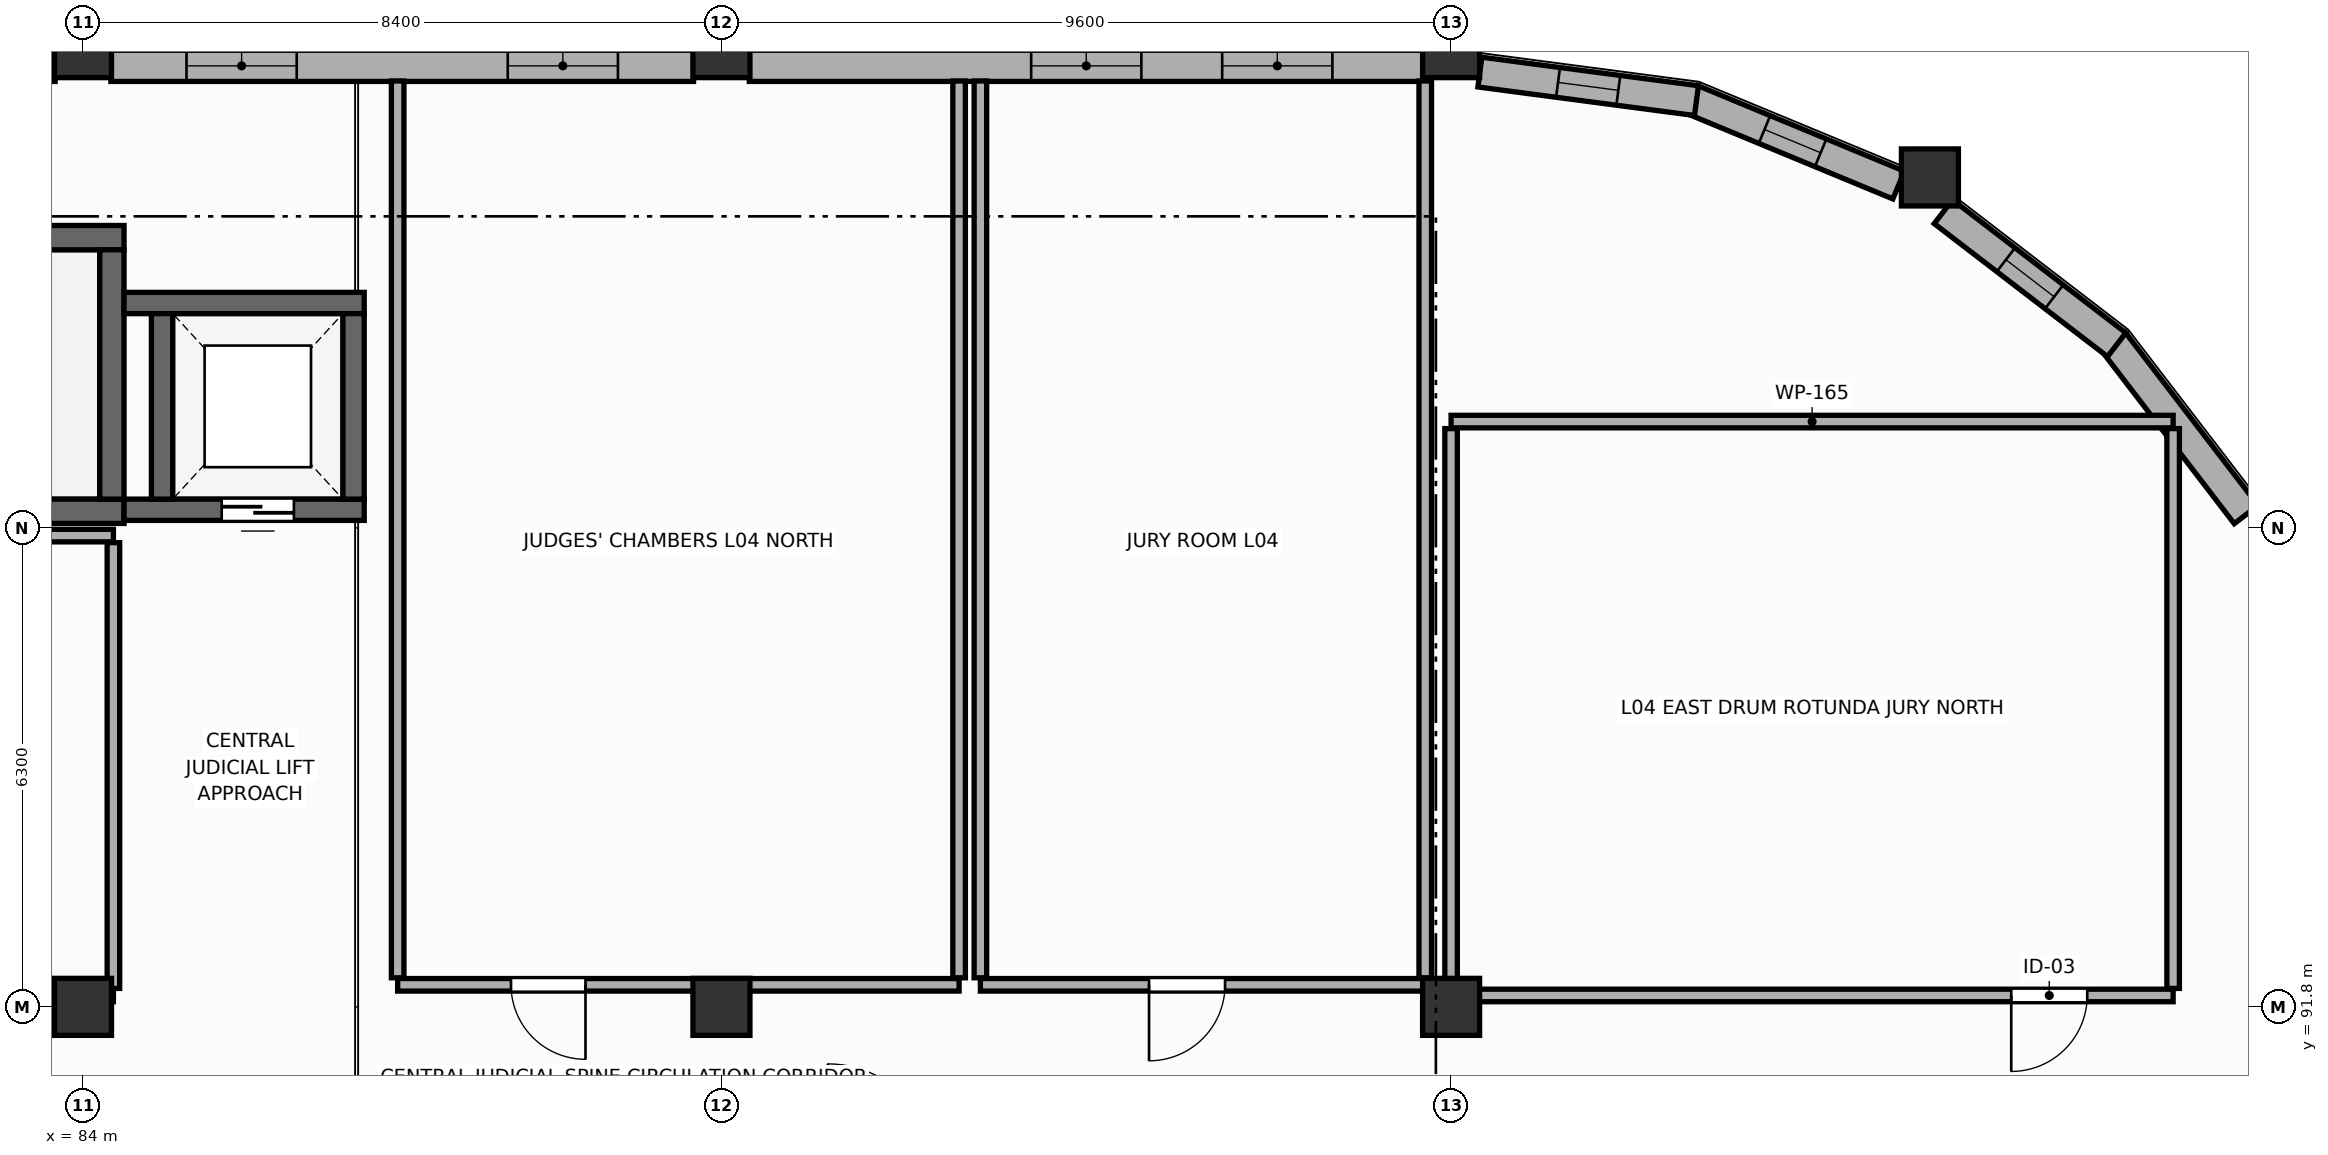
"""IFC4 building model, lengths in metres.
Left out: names, types, materials, properties, quantities, classifications, styles, units other than length and angle.
Written with IfcOpenShell. Run it as: python <this file> out.ifc"""

import sys

from ifc_helpers import new_model, si_unit, direction, frame, frame_2d, origin, origin_2d, place, context, subcontext, project, spatial, rectangle, circle, extrude, element, fill, save


model = new_model("IFC4")
c1 = context("Model", 3, precision=1e-05, world=origin(), true_north=direction((0.0, 1.0)))
c2 = subcontext(c1, "Body", "Model", "MODEL_VIEW")
j1 = project(units=[si_unit("LENGTHUNIT", "METRE"), si_unit("PLANEANGLEUNIT", "RADIAN")], contexts=[c1])
p1 = place(None, origin())
s1 = spatial("IfcSite", under=j1, at=p1, CompositionType="ELEMENT")
p2 = place(p1, origin())
s2 = spatial("IfcBuilding", under=s1, at=p2, CompositionType="ELEMENT")
p3 = place(p2, frame((0.0, 0.0, 14.4)))
s3 = spatial("IfcBuildingStorey", under=s2, at=p3, CompositionType="ELEMENT", Elevation=14.4)
for number, where, z_axis, x_axis in (
    (1, (84.0, 91.8, 0.0), (0.0, 0.0, 1.0), (1.0, 0.0, 0.0)),
    (2, (84.0, 104.4, 0.0), (0.0, 0.0, 1.0), (1.0, 0.0, 0.0)),
    (3, (92.4, 91.8, 0.0), (0.0, 0.0, 1.0), (1.0, 0.0, 0.0)),
    (4, (92.4, 104.4, 0.0), (0.0, 0.0, 1.0), (1.0, 0.0, 0.0)),
    (5, (102.0, 91.8, 0.0), (0.0, 0.0, 1.0), (1.0, 0.0, 0.0)),
    (6, (102.0, 104.4, 0.0), (0.0, 0.0, 1.0), (1.0, 0.0, 0.0)),
):
    element("IfcColumn", number, at=place(p3, frame(where, z_axis=z_axis, x_axis=x_axis)), inside=s3, PredefinedType="COLUMN", context=c2, shape_type="SweptSolid", body=[
        extrude(rectangle(XDim=0.75, YDim=0.75, at=origin_2d()), origin(), (0.0, 0.0, 1.0), 4.2),
    ])
p4 = place(p3, frame((108.3, 102.712, 0.0), z_axis=(0.0, 0.0, 1.0), x_axis=(1.0, 0.0, 0.0)))
e7 = element("IfcColumn", 7, at=p4, inside=s3, PredefinedType="COLUMN", context=c2, shape_type="SweptSolid", body=[
    extrude(circle(Radius=0.375, at=origin_2d()), origin(), (0.0, 0.0, 1.0), 4.2),
])
p5 = place(p3, frame((75.967, 104.18, 0.0), z_axis=(0.0, 0.0, 1.0), x_axis=(1.0, 0.0, 0.0)))
e8 = element("IfcWall", 8, at=p5, inside=s3, PredefinedType="STANDARD", context=c2, shape_type="SweptSolid", body=[
    extrude(rectangle(XDim=7.666, YDim=0.41, at=frame_2d((3.833, 0.0))), origin(), (0.0, 0.0, 1.0), 3.09),
])
p6 = place(p3, frame((84.367, 104.18, 0.0), z_axis=(0.0, 0.0, 1.0), x_axis=(1.0, 0.0, 0.0)))
e9 = element("IfcWall", 9, at=p6, inside=s3, PredefinedType="STANDARD", context=c2, shape_type="SweptSolid", body=[
    extrude(rectangle(XDim=7.666, YDim=0.41, at=frame_2d((3.833, 0.0))), origin(), (0.0, 0.0, 1.0), 3.09),
])
p7 = place(p6, frame((0.995, 0.0, 0.85)))
e10 = element("IfcOpeningElement", 10, at=p7, cuts=e9, PredefinedType="OPENING", context=c2, shape_type="SweptSolid", body=[
    extrude(rectangle(XDim=1.45, YDim=2.05, at=frame_2d((0.725, 1.025))), frame((0.0, 0.215, 0.0), z_axis=(0.0, -1.0, 0.0), x_axis=(1.0, 0.0, 0.0)), (0.0, 0.0, 1.0), 0.43),
])
p8 = place(p6, frame((5.221, 0.0, 0.85)))
e11 = element("IfcOpeningElement", 11, at=p8, cuts=e9, PredefinedType="OPENING", context=c2, shape_type="SweptSolid", body=[
    extrude(rectangle(XDim=1.45, YDim=2.05, at=frame_2d((0.725, 1.025))), frame((0.0, 0.215, 0.0), z_axis=(0.0, -1.0, 0.0), x_axis=(1.0, 0.0, 0.0)), (0.0, 0.0, 1.0), 0.43),
])
p9 = place(p3, frame((92.767, 104.18, 0.0), z_axis=(0.0, 0.0, 1.0), x_axis=(1.0, 0.0, 0.0)))
e12 = element("IfcWall", 12, at=p9, inside=s3, PredefinedType="STANDARD", context=c2, shape_type="SweptSolid", body=[
    extrude(rectangle(XDim=8.866, YDim=0.41, at=frame_2d((4.433, 0.0))), origin(), (0.0, 0.0, 1.0), 3.09),
])
p10 = place(p9, frame((3.708, 0.0, 0.85)))
e13 = element("IfcOpeningElement", 13, at=p10, cuts=e12, PredefinedType="OPENING", context=c2, shape_type="SweptSolid", body=[
    extrude(rectangle(XDim=1.45, YDim=2.05, at=frame_2d((0.725, 1.025))), frame((0.0, 0.215, 0.0), z_axis=(0.0, -1.0, 0.0), x_axis=(1.0, 0.0, 0.0)), (0.0, 0.0, 1.0), 0.43),
])
p11 = place(p9, frame((6.221, 0.0, 0.85)))
e14 = element("IfcOpeningElement", 14, at=p11, cuts=e12, PredefinedType="OPENING", context=c2, shape_type="SweptSolid", body=[
    extrude(rectangle(XDim=1.45, YDim=2.05, at=frame_2d((0.725, 1.025))), frame((0.0, 0.215, 0.0), z_axis=(0.0, -1.0, 0.0), x_axis=(1.0, 0.0, 0.0)), (0.0, 0.0, 1.0), 0.43),
])
p12 = place(p3, frame((112.461, 98.277, 0.0), z_axis=(0.0, 0.0, 1.0), x_axis=(-0.608770300127, 0.793346533164, 0.0)))
e15 = element("IfcWall", 15, at=p12, inside=s3, PredefinedType="ELEMENTEDWALL", context=c2, shape_type="SweptSolid", body=[
    extrude(rectangle(XDim=2.874, YDim=0.395, at=frame_2d((1.437, 0.0))), origin(), (0.0, 0.0, 1.0), 3.09),
])
p13 = place(p3, frame((110.757, 100.511, 0.0), z_axis=(0.0, 0.0, 1.0), x_axis=(-0.793346533164, 0.608770300127, 0.0)))
e16 = element("IfcWall", 16, at=p13, inside=s3, PredefinedType="ELEMENTEDWALL", context=c2, shape_type="SweptSolid", body=[
    extrude(rectangle(XDim=2.874, YDim=0.395, at=frame_2d((1.437, 0.0))), origin(), (0.0, 0.0, 1.0), 2.99),
])
p14 = place(p13, frame((1.037, 0.0, 0.85)))
e17 = element("IfcOpeningElement", 17, at=p14, cuts=e16, PredefinedType="OPENING", context=c2, shape_type="SweptSolid", body=[
    extrude(rectangle(XDim=0.8, YDim=1.7, at=frame_2d((0.4, 0.85))), frame((0.0, 0.208, 0.0), z_axis=(0.0, -1.0, 0.0), x_axis=(1.0, 0.0, 0.0)), (0.0, 0.0, 1.0), 0.415),
])
p15 = place(p3, frame((107.888, 102.612, 0.0), z_axis=(0.0, 0.0, 1.0), x_axis=(-0.923871445027, 0.382702956696, 0.0)))
e18 = element("IfcWall", 18, at=p15, inside=s3, PredefinedType="ELEMENTEDWALL", context=c2, shape_type="SweptSolid", body=[
    extrude(rectangle(XDim=2.947, YDim=0.395, at=frame_2d((1.474, 0.0))), origin(), (0.0, 0.0, 1.0), 2.99),
])
p16 = place(p15, frame((1.11, 0.0, 0.85)))
e19 = element("IfcOpeningElement", 19, at=p16, cuts=e18, PredefinedType="OPENING", context=c2, shape_type="SweptSolid", body=[
    extrude(rectangle(XDim=0.8, YDim=1.7, at=frame_2d((0.4, 0.85))), frame((0.0, 0.208, 0.0), z_axis=(0.0, -1.0, 0.0), x_axis=(1.0, 0.0, 0.0)), (0.0, 0.0, 1.0), 0.415),
])
p17 = place(p3, frame((105.229, 103.723, 0.0), z_axis=(0.0, 0.0, 1.0), x_axis=(-0.991451982445, 0.130472090904, 0.0)))
e20 = element("IfcWall", 20, at=p17, inside=s3, PredefinedType="ELEMENTEDWALL", context=c2, shape_type="SweptSolid", body=[
    extrude(rectangle(XDim=2.874, YDim=0.395, at=frame_2d((1.437, 0.0))), origin(), (0.0, 0.0, 1.0), 3.09),
])
p18 = place(p17, frame((1.037, 0.0, 0.85)))
e21 = element("IfcOpeningElement", 21, at=p18, cuts=e20, PredefinedType="OPENING", context=c2, shape_type="SweptSolid", body=[
    extrude(rectangle(XDim=0.8, YDim=1.7, at=frame_2d((0.4, 0.85))), frame((0.0, 0.208, 0.0), z_axis=(0.0, -1.0, 0.0), x_axis=(1.0, 0.0, 0.0)), (0.0, 0.0, 1.0), 0.415),
])
for number, where, z_axis, x_axis in (
    (22, (75.46, 101.92, 0.0), (0.0, 0.0, 1.0), (1.0, 0.0, 0.0)),
    (23, (84.54, 98.32, 0.0), (0.0, 0.0, 1.0), (-1.0, 0.0, 0.0)),
):
    element("IfcWall", number, at=place(p3, frame(where, z_axis=z_axis, x_axis=x_axis)), inside=s3, PredefinedType="SHEAR", context=c2, shape_type="SweptSolid", body=[
        extrude(rectangle(XDim=9.08, YDim=0.32, at=frame_2d((4.54, 0.0))), origin(), (0.0, 0.0, 1.0), 3.96),
    ])
p19 = place(p3, frame((84.38, 101.76, 0.0), z_axis=(0.0, 0.0, 1.0), x_axis=(0.0, -1.0, 0.0)))
e24 = element("IfcWall", 24, at=p19, inside=s3, PredefinedType="SHEAR", context=c2, shape_type="SweptSolid", body=[
    extrude(rectangle(XDim=3.28, YDim=0.32, at=frame_2d((1.64, 0.0))), origin(), (0.0, 0.0, 1.0), 3.96),
])
p20 = place(p3, frame((84.54, 101.06, 0.0), z_axis=(0.0, 0.0, 1.0), x_axis=(1.0, 0.0, 0.0)))
e25 = element("IfcWall", 25, at=p20, inside=s3, PredefinedType="SHEAR", context=c2, shape_type="SweptSolid", body=[
    extrude(rectangle(XDim=3.16, YDim=0.28, at=frame_2d((1.58, 0.0))), origin(), (0.0, 0.0, 1.0), 3.96),
])
p21 = place(p3, frame((87.7, 98.34, 0.0), z_axis=(0.0, 0.0, 1.0), x_axis=(-1.0, 0.0, 0.0)))
e26 = element("IfcWall", 26, at=p21, inside=s3, PredefinedType="SHEAR", context=c2, shape_type="SweptSolid", body=[
    extrude(rectangle(XDim=3.16, YDim=0.28, at=frame_2d((1.58, 0.0))), origin(), (0.0, 0.0, 1.0), 3.96),
])
p22 = place(p21, frame((0.925, 0.0, 0.0)))
e27 = element("IfcOpeningElement", 27, at=p22, cuts=e26, PredefinedType="OPENING", context=c2, shape_type="SweptSolid", body=[
    extrude(rectangle(XDim=0.95, YDim=2.15, at=frame_2d((0.475, 1.075))), frame((0.0, 0.15, 0.0), z_axis=(0.0, -1.0, 0.0), x_axis=(1.0, 0.0, 0.0)), (0.0, 0.0, 1.0), 0.3),
])
for number, where, z_axis, x_axis in (
    (28, (85.04, 98.48, 0.0), (0.0, 0.0, 1.0), (0.0, 1.0, 0.0)),
    (29, (87.56, 100.92, 0.0), (0.0, 0.0, 1.0), (0.0, -1.0, 0.0)),
):
    element("IfcWall", number, at=place(p3, frame(where, z_axis=z_axis, x_axis=x_axis)), inside=s3, PredefinedType="SHEAR", context=c2, shape_type="SweptSolid", body=[
        extrude(rectangle(XDim=2.44, YDim=0.28, at=frame_2d((1.22, 0.0))), origin(), (0.0, 0.0, 1.0), 3.96),
    ])
p23 = place(p3, frame((75.6, 98.0, 0.0), z_axis=(0.0, 0.0, 1.0), x_axis=(1.0, 0.0, 0.0)))
e30 = element("IfcWall", 30, at=p23, inside=s3, PredefinedType="PARTITIONING", context=c2, shape_type="SweptSolid", body=[
    extrude(rectangle(XDim=8.8, YDim=0.165, at=frame_2d((4.4, 0.0))), origin(), (0.0, 0.0, 1.0), 3.09),
])
p24 = place(p3, frame((84.4, 91.95, 0.0), z_axis=(0.0, 0.0, 1.0), x_axis=(-1.0, 0.0, 0.0)))
e31 = element("IfcWall", 31, at=p24, inside=s3, PredefinedType="PARTITIONING", context=c2, shape_type="SweptSolid", body=[
    extrude(rectangle(XDim=8.8, YDim=0.165, at=frame_2d((4.4, 0.0))), origin(), (0.0, 0.0, 1.0), 3.09),
])
p25 = place(p24, frame((3.545, 0.0, 0.0)))
e32 = element("IfcOpeningElement", 32, at=p25, cuts=e31, PredefinedType="OPENING", context=c2, shape_type="SweptSolid", body=[
    extrude(rectangle(XDim=1.0, YDim=2.15, at=frame_2d((0.5, 1.075))), frame((0.0, 0.093, 0.0), z_axis=(0.0, -1.0, 0.0), x_axis=(1.0, 0.0, 0.0)), (0.0, 0.0, 1.0), 0.185),
])
p26 = place(p3, frame((84.4, 97.907, 0.0), z_axis=(0.0, 0.0, 1.0), x_axis=(0.0, -1.0, 0.0)))
e33 = element("IfcWall", 33, at=p26, inside=s3, PredefinedType="PARTITIONING", context=c2, shape_type="SweptSolid", body=[
    extrude(rectangle(XDim=5.865, YDim=0.165, at=frame_2d((2.933, 0.0))), origin(), (0.0, 0.0, 1.0), 3.09),
])
p27 = place(p3, frame((95.527, 92.09, 0.0), z_axis=(0.0, 0.0, 1.0), x_axis=(-1.0, 0.0, 0.0)))
e34 = element("IfcWall", 34, at=p27, inside=s3, PredefinedType="PARTITIONING", context=c2, shape_type="SweptSolid", body=[
    extrude(rectangle(XDim=7.387, YDim=0.165, at=frame_2d((3.694, 0.0))), origin(), (0.0, 0.0, 1.0), 3.09),
])
p28 = place(p27, frame((4.916, 0.0, 0.0)))
e35 = element("IfcOpeningElement", 35, at=p28, cuts=e34, PredefinedType="OPENING", context=c2, shape_type="SweptSolid", body=[
    extrude(rectangle(XDim=0.98, YDim=2.2, at=frame_2d((0.49, 1.1))), frame((0.0, 0.093, 0.0), z_axis=(0.0, -1.0, 0.0), x_axis=(1.0, 0.0, 0.0)), (0.0, 0.0, 1.0), 0.185),
])
p29 = place(p3, frame((88.14, 92.183, 0.0), z_axis=(0.0, 0.0, 1.0), x_axis=(0.0, 1.0, 0.0)))
e36 = element("IfcWall", 36, at=p29, inside=s3, PredefinedType="PARTITIONING", context=c2, shape_type="SweptSolid", body=[
    extrude(rectangle(XDim=11.798, YDim=0.165, at=frame_2d((5.899, 0.0))), origin(), (0.0, 0.0, 1.0), 3.39),
])
p30 = place(p3, frame((95.527, 103.981, 0.0), z_axis=(0.0, 0.0, 1.0), x_axis=(0.0, -1.0, 0.0)))
e37 = element("IfcWall", 37, at=p30, inside=s3, PredefinedType="PARTITIONING", context=c2, shape_type="SweptSolid", body=[
    extrude(rectangle(XDim=11.798, YDim=0.165, at=frame_2d((5.899, 0.0))), origin(), (0.0, 0.0, 1.0), 3.29),
])
p31 = place(p3, frame((101.66, 92.09, 0.0), z_axis=(0.0, 0.0, 1.0), x_axis=(-1.0, 0.0, 0.0)))
e38 = element("IfcWall", 38, at=p31, inside=s3, PredefinedType="PARTITIONING", context=c2, shape_type="SweptSolid", body=[
    extrude(rectangle(XDim=5.853, YDim=0.165, at=frame_2d((2.927, 0.0))), origin(), (0.0, 0.0, 1.0), 3.09),
])
p32 = place(p31, frame((2.634, 0.0, 0.0)))
e39 = element("IfcOpeningElement", 39, at=p32, cuts=e38, PredefinedType="OPENING", context=c2, shape_type="SweptSolid", body=[
    extrude(rectangle(XDim=1.0, YDim=2.15, at=frame_2d((0.5, 1.075))), frame((0.0, 0.093, 0.0), z_axis=(0.0, -1.0, 0.0), x_axis=(1.0, 0.0, 0.0)), (0.0, 0.0, 1.0), 0.185),
])
p33 = place(p3, frame((95.807, 92.183, 0.0), z_axis=(0.0, 0.0, 1.0), x_axis=(0.0, 1.0, 0.0)))
e40 = element("IfcWall", 40, at=p33, inside=s3, PredefinedType="PARTITIONING", context=c2, shape_type="SweptSolid", body=[
    extrude(rectangle(XDim=11.798, YDim=0.165, at=frame_2d((5.899, 0.0))), origin(), (0.0, 0.0, 1.0), 3.29),
])
p34 = place(p3, frame((101.66, 103.981, 0.0), z_axis=(0.0, 0.0, 1.0), x_axis=(0.0, -1.0, 0.0)))
e41 = element("IfcWall", 41, at=p34, inside=s3, PredefinedType="PARTITIONING", context=c2, shape_type="SweptSolid", body=[
    extrude(rectangle(XDim=11.798, YDim=0.165, at=frame_2d((5.899, 0.0))), origin(), (0.0, 0.0, 1.0), 3.09),
])
p35 = place(p3, frame((102.0, 99.5, 0.0), z_axis=(0.0, 0.0, 1.0), x_axis=(1.0, 0.0, 0.0)))
e42 = element("IfcWall", 42, at=p35, inside=s3, PredefinedType="PARTITIONING", context=c2, shape_type="SweptSolid", body=[
    extrude(rectangle(XDim=9.5, YDim=0.165, at=frame_2d((4.75, 0.0))), origin(), (0.0, 0.0, 1.0), 2.99),
])
p36 = place(p3, frame((111.5, 91.95, 0.0), z_axis=(0.0, 0.0, 1.0), x_axis=(-1.0, 0.0, 0.0)))
e43 = element("IfcWall", 43, at=p36, inside=s3, PredefinedType="PARTITIONING", context=c2, shape_type="SweptSolid", body=[
    extrude(rectangle(XDim=9.5, YDim=0.165, at=frame_2d((4.75, 0.0))), origin(), (0.0, 0.0, 1.0), 2.99),
])
p37 = place(p36, frame((1.13, 0.0, 0.0)))
e44 = element("IfcOpeningElement", 44, at=p37, cuts=e43, PredefinedType="OPENING", context=c2, shape_type="SweptSolid", body=[
    extrude(rectangle(XDim=1.0, YDim=2.15, at=frame_2d((0.5, 1.075))), frame((0.0, 0.093, 0.0), z_axis=(0.0, -1.0, 0.0), x_axis=(1.0, 0.0, 0.0)), (0.0, 0.0, 1.0), 0.185),
])
for number, where, z_axis, x_axis in (
    (45, (102.0, 92.042, 0.0), (0.0, 0.0, 1.0), (0.0, 1.0, 0.0)),
    (46, (111.5, 99.407, 0.0), (0.0, 0.0, 1.0), (0.0, -1.0, 0.0)),
):
    element("IfcWall", number, at=place(p3, frame(where, z_axis=z_axis, x_axis=x_axis)), inside=s3, PredefinedType="PARTITIONING", context=c2, shape_type="SweptSolid", body=[
        extrude(rectangle(XDim=7.365, YDim=0.165, at=frame_2d((3.683, 0.0))), origin(), (0.0, 0.0, 1.0), 3.09),
    ])
p38 = place(p7, origin())
e47 = element("IfcWindow", 47, at=p38, inside=s3, PartitioningType="SINGLE_PANEL", PredefinedType="WINDOW", context=c2, shape_type="SweptSolid", body=[
    extrude(rectangle(XDim=1.45, YDim=2.05, at=frame_2d((0.725, 1.025))), frame((0.0, 0.03, 0.0), z_axis=(0.0, -1.0, 0.0), x_axis=(1.0, 0.0, 0.0)), (0.0, 0.0, 1.0), 0.06),
])
fill(e10, e47)
p39 = place(p8, origin())
e48 = element("IfcWindow", 48, at=p39, inside=s3, PartitioningType="SINGLE_PANEL", PredefinedType="WINDOW", context=c2, shape_type="SweptSolid", body=[
    extrude(rectangle(XDim=1.45, YDim=2.05, at=frame_2d((0.725, 1.025))), frame((0.0, 0.03, 0.0), z_axis=(0.0, -1.0, 0.0), x_axis=(1.0, 0.0, 0.0)), (0.0, 0.0, 1.0), 0.06),
])
fill(e11, e48)
p40 = place(p10, origin())
e49 = element("IfcWindow", 49, at=p40, inside=s3, PartitioningType="SINGLE_PANEL", PredefinedType="WINDOW", context=c2, shape_type="SweptSolid", body=[
    extrude(rectangle(XDim=1.45, YDim=2.05, at=frame_2d((0.725, 1.025))), frame((0.0, 0.03, 0.0), z_axis=(0.0, -1.0, 0.0), x_axis=(1.0, 0.0, 0.0)), (0.0, 0.0, 1.0), 0.06),
])
fill(e13, e49)
p41 = place(p11, origin())
e50 = element("IfcWindow", 50, at=p41, inside=s3, PartitioningType="SINGLE_PANEL", PredefinedType="WINDOW", context=c2, shape_type="SweptSolid", body=[
    extrude(rectangle(XDim=1.45, YDim=2.05, at=frame_2d((0.725, 1.025))), frame((0.0, 0.03, 0.0), z_axis=(0.0, -1.0, 0.0), x_axis=(1.0, 0.0, 0.0)), (0.0, 0.0, 1.0), 0.06),
])
fill(e14, e50)
p42 = place(p14, origin())
e51 = element("IfcWindow", 51, at=p42, inside=s3, PartitioningType="SINGLE_PANEL", PredefinedType="WINDOW", context=c2, shape_type="SweptSolid", body=[
    extrude(rectangle(XDim=0.8, YDim=1.7, at=frame_2d((0.4, 0.85))), frame((0.0, 0.03, 0.0), z_axis=(0.0, -1.0, 0.0), x_axis=(1.0, 0.0, 0.0)), (0.0, 0.0, 1.0), 0.06),
])
fill(e17, e51)
p43 = place(p16, origin())
e52 = element("IfcWindow", 52, at=p43, inside=s3, PartitioningType="SINGLE_PANEL", PredefinedType="WINDOW", context=c2, shape_type="SweptSolid", body=[
    extrude(rectangle(XDim=0.8, YDim=1.7, at=frame_2d((0.4, 0.85))), frame((0.0, 0.03, 0.0), z_axis=(0.0, -1.0, 0.0), x_axis=(1.0, 0.0, 0.0)), (0.0, 0.0, 1.0), 0.06),
])
fill(e19, e52)
p44 = place(p18, origin())
e53 = element("IfcWindow", 53, at=p44, inside=s3, PartitioningType="SINGLE_PANEL", PredefinedType="WINDOW", context=c2, shape_type="SweptSolid", body=[
    extrude(rectangle(XDim=0.8, YDim=1.7, at=frame_2d((0.4, 0.85))), frame((0.0, 0.03, 0.0), z_axis=(0.0, -1.0, 0.0), x_axis=(1.0, 0.0, 0.0)), (0.0, 0.0, 1.0), 0.06),
])
fill(e21, e53)
p45 = place(p22, origin())
e54 = element("IfcDoor", 54, at=p45, inside=s3, OperationType="DOUBLE_DOOR_SLIDING", PredefinedType="DOOR", context=c2, shape_type="SweptSolid", body=[
    extrude(rectangle(XDim=0.95, YDim=2.15, at=frame_2d((0.475, 1.075))), frame((0.0, 0.025, 0.0), z_axis=(0.0, -1.0, 0.0), x_axis=(1.0, 0.0, 0.0)), (0.0, 0.0, 1.0), 0.05),
])
fill(e27, e54)
p46 = place(p28, origin())
e55 = element("IfcDoor", 55, at=p46, inside=s3, OperationType="SINGLE_SWING_LEFT", PredefinedType="DOOR", context=c2, shape_type="SweptSolid", body=[
    extrude(rectangle(XDim=0.98, YDim=2.2, at=frame_2d((0.49, 1.1))), frame((0.0, 0.025, 0.0), z_axis=(0.0, -1.0, 0.0), x_axis=(1.0, 0.0, 0.0)), (0.0, 0.0, 1.0), 0.05),
])
fill(e35, e55)
p47 = place(p32, origin())
e56 = element("IfcDoor", 56, at=p47, inside=s3, OperationType="SINGLE_SWING_RIGHT", PredefinedType="DOOR", context=c2, shape_type="SweptSolid", body=[
    extrude(rectangle(XDim=1.0, YDim=2.15, at=frame_2d((0.5, 1.075))), frame((0.0, 0.025, 0.0), z_axis=(0.0, -1.0, 0.0), x_axis=(1.0, 0.0, 0.0)), (0.0, 0.0, 1.0), 0.05),
])
fill(e39, e56)
p48 = place(p37, origin())
e57 = element("IfcDoor", 57, at=p48, inside=s3, OperationType="SINGLE_SWING_RIGHT", PredefinedType="DOOR", context=c2, shape_type="SweptSolid", body=[
    extrude(rectangle(XDim=1.0, YDim=2.15, at=frame_2d((0.5, 1.075))), frame((0.0, 0.025, 0.0), z_axis=(0.0, -1.0, 0.0), x_axis=(1.0, 0.0, 0.0)), (0.0, 0.0, 1.0), 0.05),
])
fill(e44, e57)
save(model, sys.argv[1])
